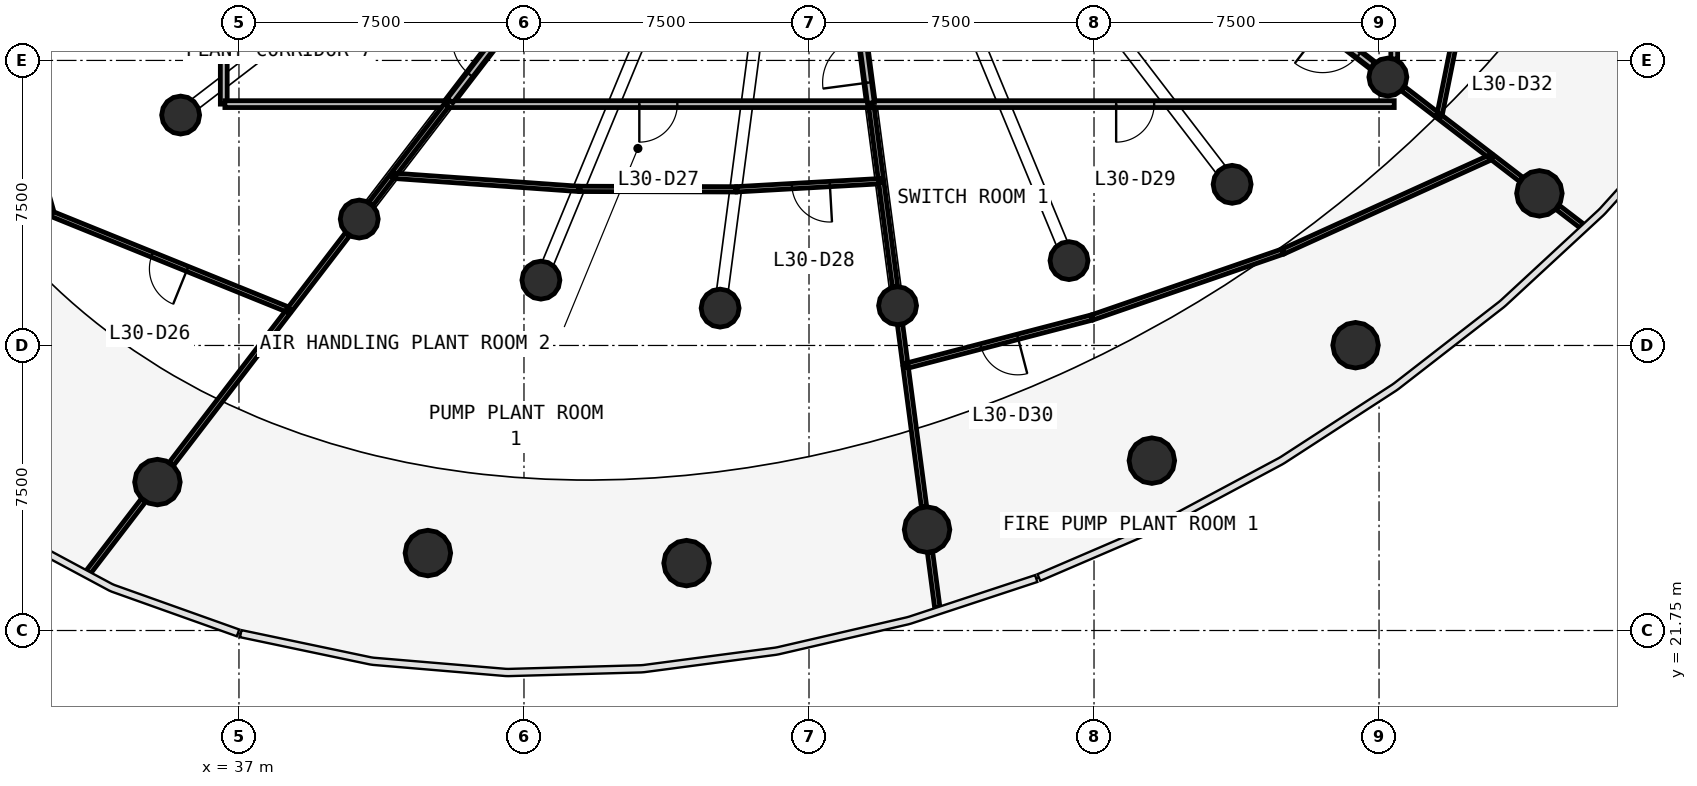
"""IFC4 building model, lengths in metres.
Left out: names, types, materials, properties, quantities, classifications, styles, units other than length and angle.
Written with IfcOpenShell. Run it as: python <this file> out.ifc"""

import sys

from ifc_helpers import new_model, si_unit, direction, frame, frame_2d, origin, origin_2d, place, context, subcontext, project, spatial, rectangle, circle, extrude, source, transform, mapped, element, fill, save


model = new_model("IFC4")
c1 = context("Model", 3, precision=1e-05, world=origin(), true_north=direction((0.0, 1.0)))
c2 = subcontext(c1, "Body", "Model", "MODEL_VIEW")
j1 = project(units=[si_unit("LENGTHUNIT", "METRE"), si_unit("PLANEANGLEUNIT", "RADIAN")], contexts=[c1])
p1 = place(None, origin())
s1 = spatial("IfcSite", under=j1, at=p1, CompositionType="ELEMENT")
p2 = place(p1, origin())
s2 = spatial("IfcBuilding", under=s1, at=p2, CompositionType="ELEMENT")
p3 = place(p2, frame((0.0, 0.0, 129.0)))
s3 = spatial("IfcBuildingStorey", under=s2, at=p3, CompositionType="ELEMENT", Elevation=129.0)
m1 = source(origin(), c2, "Body", "SweptSolid", [
    extrude(circle(Radius=0.6, at=origin_2d()), origin(), (0.0, 0.0, 1.0), 3.78),
])
for number, where, z_axis, x_axis in (
    (1, (34.854, 25.655, 0.0), (0.0, 0.0, 1.0), (1.0, 0.0, 0.0)),
    (2, (41.971, 23.788, 0.0), (0.0, 0.0, 1.0), (1.0, 0.0, 0.0)),
    (3, (48.778, 23.523, 0.0), (0.0, 0.0, 1.0), (1.0, 0.0, 0.0)),
    (4, (55.106, 24.405, 0.0), (0.0, 0.0, 1.0), (1.0, 0.0, 0.0)),
    (5, (61.022, 26.219, 0.0), (0.0, 0.0, 1.0), (1.0, 0.0, 0.0)),
    (6, (66.382, 29.257, 0.0), (0.0, 0.0, 1.0), (1.0, 0.0, 0.0)),
    (7, (71.22, 33.252, 0.0), (0.0, 0.0, 1.0), (1.0, 0.0, 0.0)),
):
    element("IfcColumn", number, at=place(p3, frame(where, z_axis=z_axis, x_axis=x_axis)), inside=s3, PredefinedType="COLUMN", context=c2, shape_type="MappedRepresentation", body=[
        mapped(m1, transform((0.0, 0.0, 0.0), scale=1.0)),
    ])
m2 = source(origin(), c2, "Body", "SweptSolid", [
    extrude(circle(Radius=0.5, at=origin_2d()), origin(), (0.0, 0.0, 1.0), 3.78),
])
for number, where, z_axis, x_axis in (
    (8, (35.465, 35.312, 0.0), (0.0, 0.0, 1.0), (1.0, 0.0, 0.0)),
    (9, (40.165, 32.576, 0.0), (0.0, 0.0, 1.0), (1.0, 0.0, 0.0)),
    (10, (44.945, 30.969, 0.0), (0.0, 0.0, 1.0), (1.0, 0.0, 0.0)),
    (11, (49.661, 30.233, 0.0), (0.0, 0.0, 1.0), (1.0, 0.0, 0.0)),
    (12, (54.331, 30.297, 0.0), (0.0, 0.0, 1.0), (1.0, 0.0, 0.0)),
    (13, (58.842, 31.482, 0.0), (0.0, 0.0, 1.0), (1.0, 0.0, 0.0)),
    (14, (63.134, 33.49, 0.0), (0.0, 0.0, 1.0), (1.0, 0.0, 0.0)),
    (15, (67.232, 36.312, 0.0), (0.0, 0.0, 1.0), (1.0, 0.0, 0.0)),
):
    element("IfcColumn", number, at=place(p3, frame(where, z_axis=z_axis, x_axis=x_axis)), inside=s3, PredefinedType="COLUMN", context=c2, shape_type="MappedRepresentation", body=[
        mapped(m2, transform((0.0, 0.0, 0.0), scale=1.0)),
    ])
p4 = place(p3, frame((67.4, 35.6, 0.0), z_axis=(0.0, 0.0, 1.0), x_axis=(-1.0, 0.0, 0.0)))
e16 = element("IfcWall", 16, at=p4, inside=s3, PredefinedType="PARTITIONING", context=c2, shape_type="SweptSolid", body=[
    extrude(rectangle(XDim=13.767, YDim=0.18, at=frame_2d((6.884, 0.0))), origin(), (0.0, 0.0, 1.0), 2.58),
])
p5 = place(p4, frame((6.317, 0.0, 0.0)))
e17 = element("IfcOpeningElement", 17, at=p5, cuts=e16, PredefinedType="OPENING", context=c2, shape_type="SweptSolid", body=[
    extrude(rectangle(XDim=1.0, YDim=2.1, at=frame_2d((0.5, 1.05))), frame((0.0, 0.1, 0.0), z_axis=(0.0, -1.0, 0.0), x_axis=(1.0, 0.0, 0.0)), (0.0, 0.0, 1.0), 0.2),
])
p6 = place(p3, frame((67.4, 50.027, 0.0), z_axis=(0.0, 0.0, 1.0), x_axis=(0.0, -1.0, 0.0)))
e18 = element("IfcWall", 18, at=p6, inside=s3, PredefinedType="PARTITIONING", context=c2, shape_type="SweptSolid", body=[
    extrude(rectangle(XDim=13.24, YDim=0.18, at=frame_2d((6.62, 0.0))), origin(), (0.0, 0.0, 1.0), 2.58),
])
p7 = place(p6, frame((6.19, 0.0, 0.0)))
e19 = element("IfcOpeningElement", 19, at=p7, cuts=e18, PredefinedType="OPENING", context=c2, shape_type="SweptSolid", body=[
    extrude(rectangle(XDim=1.0, YDim=2.1, at=frame_2d((0.5, 1.05))), frame((0.0, 0.1, 0.0), z_axis=(0.0, -1.0, 0.0), x_axis=(1.0, 0.0, 0.0)), (0.0, 0.0, 1.0), 0.2),
])
p8 = place(p3, frame((53.603, 35.6, 0.0), z_axis=(0.0, 0.0, 1.0), x_axis=(-1.0, 0.0, 0.0)))
e20 = element("IfcWall", 20, at=p8, inside=s3, PredefinedType="PARTITIONING", context=c2, shape_type="SweptSolid", body=[
    extrude(rectangle(XDim=11.117, YDim=0.18, at=frame_2d((5.559, 0.0))), origin(), (0.0, 0.0, 1.0), 2.58),
])
p9 = place(p8, frame((5.067, 0.0, 0.0)))
e21 = element("IfcOpeningElement", 21, at=p9, cuts=e20, PredefinedType="OPENING", context=c2, shape_type="SweptSolid", body=[
    extrude(rectangle(XDim=1.0, YDim=2.1, at=frame_2d((0.5, 1.05))), frame((0.0, 0.1, 0.0), z_axis=(0.0, -1.0, 0.0), x_axis=(1.0, 0.0, 0.0)), (0.0, 0.0, 1.0), 0.2),
])
p10 = place(p3, frame((36.6, 35.6, 0.0), z_axis=(0.0, 0.0, 1.0), x_axis=(0.0, 1.0, 0.0)))
e22 = element("IfcWall", 22, at=p10, inside=s3, PredefinedType="PARTITIONING", context=c2, shape_type="SweptSolid", body=[
    extrude(rectangle(XDim=10.343, YDim=0.18, at=frame_2d((5.171, 0.0))), origin(), (0.0, 0.0, 1.0), 2.58),
])
p11 = place(p10, frame((4.693, 0.0, 0.0)))
e23 = element("IfcOpeningElement", 23, at=p11, cuts=e22, PredefinedType="OPENING", context=c2, shape_type="SweptSolid", body=[
    extrude(rectangle(XDim=1.0, YDim=2.1, at=frame_2d((0.5, 1.05))), frame((0.0, 0.1, 0.0), z_axis=(0.0, -1.0, 0.0), x_axis=(1.0, 0.0, 0.0)), (0.0, 0.0, 1.0), 0.2),
])
p12 = place(p3, frame((36.63, 35.6, 0.0), z_axis=(0.0, 0.0, 1.0), x_axis=(1.0, 0.0, 0.0)))
e24 = element("IfcWall", 24, at=p12, inside=s3, PredefinedType="PARTITIONING", context=c2, shape_type="SweptSolid", body=[
    extrude(rectangle(XDim=5.825, YDim=0.18, at=frame_2d((2.913, 0.0))), origin(), (0.0, 0.0, 1.0), 2.58),
])
p13 = place(p3, frame((42.554, 35.69, 0.0), z_axis=(0.0, 0.0, 1.0), x_axis=(0.608737787706, 0.793371480341, 0.0)))
e25 = element("IfcWall", 25, at=p13, inside=s3, PredefinedType="PARTITIONING", context=c2, shape_type="SweptSolid", body=[
    extrude(rectangle(XDim=2.912, YDim=0.18, at=frame_2d((1.456, 0.0))), origin(), (0.0, 0.0, 1.0), 2.58),
])
p14 = place(p13, frame((0.862, 0.0, 0.0)))
e26 = element("IfcOpeningElement", 26, at=p14, cuts=e25, PredefinedType="OPENING", context=c2, shape_type="SweptSolid", body=[
    extrude(rectangle(XDim=1.2, YDim=2.1, at=frame_2d((0.6, 1.05))), frame((0.0, 0.1, 0.0), z_axis=(0.0, -1.0, 0.0), x_axis=(1.0, 0.0, 0.0)), (0.0, 0.0, 1.0), 0.2),
])
p15 = place(p3, frame((53.629, 35.63, 0.0), z_axis=(0.0, 0.0, 1.0), x_axis=(-0.13060507681, 0.991434472828, 0.0)))
e27 = element("IfcWall", 27, at=p15, inside=s3, PredefinedType="PARTITIONING", context=c2, shape_type="SweptSolid", body=[
    extrude(rectangle(XDim=2.391, YDim=0.18, at=frame_2d((1.195, 0.0))), origin(), (0.0, 0.0, 1.0), 2.58),
])
p16 = place(p15, frame((0.541, 0.0, 0.0)))
e28 = element("IfcOpeningElement", 28, at=p16, cuts=e27, PredefinedType="OPENING", context=c2, shape_type="SweptSolid", body=[
    extrude(rectangle(XDim=1.2, YDim=2.1, at=frame_2d((0.6, 1.05))), frame((0.0, 0.1, 0.0), z_axis=(0.0, -1.0, 0.0), x_axis=(1.0, 0.0, 0.0)), (0.0, 0.0, 1.0), 0.2),
])
p17 = place(p3, frame((66.832, 36.619, 0.0), z_axis=(0.0, 0.0, 1.0), x_axis=(-0.793393624489, 0.608708926023, 0.0)))
e29 = element("IfcWall", 29, at=p17, inside=s3, PredefinedType="PARTITIONING", context=c2, shape_type="SweptSolid", body=[
    extrude(rectangle(XDim=2.309, YDim=0.18, at=frame_2d((1.155, 0.0))), origin(), (0.0, 0.0, 1.0), 2.58),
])
p18 = place(p17, frame((0.459, 0.0, 0.0)))
e30 = element("IfcOpeningElement", 30, at=p18, cuts=e29, PredefinedType="OPENING", context=c2, shape_type="SweptSolid", body=[
    extrude(rectangle(XDim=1.2, YDim=2.1, at=frame_2d((0.6, 1.05))), frame((0.0, 0.1, 0.0), z_axis=(0.0, -1.0, 0.0), x_axis=(1.0, 0.0, 0.0)), (0.0, 0.0, 1.0), 0.2),
])
p19 = place(p3, frame((38.325, 30.179, 0.0), z_axis=(0.0, 0.0, 1.0), x_axis=(-0.926824754309, 0.375494174122, 0.0)))
e31 = element("IfcWall", 31, at=p19, inside=s3, PredefinedType="PARTITIONING", context=c2, shape_type="SweptSolid", body=[
    extrude(rectangle(XDim=6.744, YDim=0.14, at=frame_2d((3.372, 0.0))), origin(), (0.0, 0.0, 1.0), 2.58),
])
p20 = place(p19, frame((2.894, 0.0, 0.0)))
e32 = element("IfcOpeningElement", 32, at=p20, cuts=e31, PredefinedType="OPENING", context=c2, shape_type="SweptSolid", body=[
    extrude(rectangle(XDim=1.0, YDim=2.1, at=frame_2d((0.5, 1.05))), frame((0.0, 0.08, 0.0), z_axis=(0.0, -1.0, 0.0), x_axis=(1.0, 0.0, 0.0)), (0.0, 0.0, 1.0), 0.16),
])
p21 = place(p3, frame((30.288, 39.006, 0.0), z_axis=(0.0, 0.0, 1.0), x_axis=(0.273146643533, -0.961972406635, 0.0)))
e33 = element("IfcWall", 33, at=p21, inside=s3, PredefinedType="PARTITIONING", context=c2, shape_type="SweptSolid", body=[
    extrude(rectangle(XDim=6.514, YDim=0.14, at=frame_2d((3.257, 0.0))), origin(), (0.0, 0.0, 1.0), 2.58),
])
p22 = place(p3, frame((64.486, 31.728, 0.0), z_axis=(0.0, 0.0, 1.0), x_axis=(0.910630285698, 0.413222074397, 0.0)))
e34 = element("IfcWall", 34, at=p22, inside=s3, PredefinedType="PARTITIONING", context=c2, shape_type="SweptSolid", body=[
    extrude(rectangle(XDim=6.018, YDim=0.14, at=frame_2d((3.009, 0.0))), origin(), (0.0, 0.0, 1.0), 2.58),
])
p23 = place(p3, frame((69.672, 40.68, 0.0), z_axis=(0.0, 0.0, 1.0), x_axis=(-0.197248441668, -0.980353534323, 0.0)))
e35 = element("IfcWall", 35, at=p23, inside=s3, PredefinedType="PARTITIONING", context=c2, shape_type="SweptSolid", body=[
    extrude(rectangle(XDim=5.514, YDim=0.14, at=frame_2d((2.757, 0.0))), origin(), (0.0, 0.0, 1.0), 2.58),
])
p24 = place(p23, frame((2.264, 0.0, 0.0)))
e36 = element("IfcOpeningElement", 36, at=p24, cuts=e35, PredefinedType="OPENING", context=c2, shape_type="SweptSolid", body=[
    extrude(rectangle(XDim=1.0, YDim=2.1, at=frame_2d((0.5, 1.05))), frame((0.0, 0.08, 0.0), z_axis=(0.0, -1.0, 0.0), x_axis=(1.0, 0.0, 0.0)), (0.0, 0.0, 1.0), 0.16),
])
p25 = place(p3, frame((59.46, 29.99, 0.0), z_axis=(0.0, 0.0, 1.0), x_axis=(0.945116087861, 0.326734724918, 0.0)))
e37 = element("IfcWall", 37, at=p25, inside=s3, PredefinedType="PARTITIONING", context=c2, shape_type="SweptSolid", body=[
    extrude(rectangle(XDim=5.288, YDim=0.14, at=frame_2d((2.644, 0.0))), origin(), (0.0, 0.0, 1.0), 2.58),
])
p26 = place(p3, frame((38.281, 30.121, 0.0), z_axis=(0.0, 0.0, 1.0), x_axis=(-0.60874767724, -0.793363892205, 0.0)))
e38 = element("IfcWall", 38, at=p26, inside=s3, PredefinedType="PARTITIONING", context=c2, shape_type="SweptSolid", body=[
    extrude(rectangle(XDim=5.025, YDim=0.14, at=frame_2d((2.513, 0.0))), origin(), (0.0, 0.0, 1.0), 2.58),
])
p27 = place(p3, frame((59.431, 29.983, 0.0), z_axis=(0.0, 0.0, 1.0), x_axis=(-0.967691095233, -0.252138739998, 0.0)))
e39 = element("IfcWall", 39, at=p27, inside=s3, PredefinedType="PARTITIONING", context=c2, shape_type="SweptSolid", body=[
    extrude(rectangle(XDim=5.054, YDim=0.14, at=frame_2d((2.527, 0.0))), origin(), (0.0, 0.0, 1.0), 2.58),
])
p28 = place(p27, frame((2.004, 0.0, 0.0)))
e40 = element("IfcOpeningElement", 40, at=p28, cuts=e39, PredefinedType="OPENING", context=c2, shape_type="SweptSolid", body=[
    extrude(rectangle(XDim=1.0, YDim=2.1, at=frame_2d((0.5, 1.05))), frame((0.0, 0.08, 0.0), z_axis=(0.0, -1.0, 0.0), x_axis=(1.0, 0.0, 0.0)), (0.0, 0.0, 1.0), 0.16),
])
p29 = place(p3, frame((41.04, 33.717, 0.0), z_axis=(0.0, 0.0, 1.0), x_axis=(0.997502909213, -0.070625392825, 0.0)))
e41 = element("IfcWall", 41, at=p29, inside=s3, PredefinedType="PARTITIONING", context=c2, shape_type="SweptSolid", body=[
    extrude(rectangle(XDim=4.912, YDim=0.14, at=frame_2d((2.456, 0.0))), origin(), (0.0, 0.0, 1.0), 2.58),
])
p30 = place(p3, frame((45.97, 33.37, 0.0), z_axis=(0.0, 0.0, 1.0), x_axis=(0.999995748074, -0.002916133527, 0.0)))
e42 = element("IfcWall", 42, at=p30, inside=s3, PredefinedType="PARTITIONING", context=c2, shape_type="SweptSolid", body=[
    extrude(rectangle(XDim=4.102, YDim=0.14, at=frame_2d((2.051, 0.0))), origin(), (0.0, 0.0, 1.0), 2.58),
])
p31 = place(p3, frame((53.899, 33.574, 0.0), z_axis=(0.0, 0.0, 1.0), x_axis=(-0.998406558005, -0.056430000288, 0.0)))
e43 = element("IfcWall", 43, at=p31, inside=s3, PredefinedType="PARTITIONING", context=c2, shape_type="SweptSolid", body=[
    extrude(rectangle(XDim=3.803, YDim=0.14, at=frame_2d((1.901, 0.0))), origin(), (0.0, 0.0, 1.0), 2.58),
])
p32 = place(p31, frame((1.353, 0.0, 0.0)))
e44 = element("IfcOpeningElement", 44, at=p32, cuts=e43, PredefinedType="OPENING", context=c2, shape_type="SweptSolid", body=[
    extrude(rectangle(XDim=1.0, YDim=2.1, at=frame_2d((0.5, 1.05))), frame((0.0, 0.08, 0.0), z_axis=(0.0, -1.0, 0.0), x_axis=(1.0, 0.0, 0.0)), (0.0, 0.0, 1.0), 0.16),
])
p33 = place(p3, frame((54.544, 28.678, 0.0), z_axis=(0.0, 0.0, 1.0), x_axis=(0.130558454313, -0.991440613455, 0.0)))
e45 = element("IfcWall", 45, at=p33, inside=s3, PredefinedType="PARTITIONING", context=c2, shape_type="SweptSolid", body=[
    extrude(rectangle(XDim=3.706, YDim=0.14, at=frame_2d((1.853, 0.0))), origin(), (0.0, 0.0, 1.0), 2.58),
])
p34 = place(p3, frame((53.903, 33.545, 0.0), z_axis=(0.0, 0.0, 1.0), x_axis=(0.130536537493, -0.991443499338, 0.0)))
e46 = element("IfcWall", 46, at=p34, inside=s3, PredefinedType="PARTITIONING", context=c2, shape_type="SweptSolid", body=[
    extrude(rectangle(XDim=2.772, YDim=0.14, at=frame_2d((1.386, 0.0))), origin(), (0.0, 0.0, 1.0), 2.58),
])
p35 = place(p3, frame((39.858, 32.176, 0.0), z_axis=(0.0, 0.0, 1.0), x_axis=(-0.608804420468, -0.793320349934, 0.0)))
e47 = element("IfcWall", 47, at=p35, inside=s3, PredefinedType="PARTITIONING", context=c2, shape_type="SweptSolid", body=[
    extrude(rectangle(XDim=2.488, YDim=0.14, at=frame_2d((1.244, 0.0))), origin(), (0.0, 0.0, 1.0), 2.58),
])
p36 = place(p3, frame((34.486, 25.176, 0.0), z_axis=(0.0, 0.0, 1.0), x_axis=(-0.608723111947, -0.793382740537, 0.0)))
e48 = element("IfcWall", 48, at=p36, inside=s3, PredefinedType="PARTITIONING", context=c2, shape_type="SweptSolid", body=[
    extrude(rectangle(XDim=2.39, YDim=0.14, at=frame_2d((1.195, 0.0))), origin(), (0.0, 0.0, 1.0), 2.98),
])
p37 = place(p3, frame((42.463, 35.571, 0.0), z_axis=(0.0, 0.0, 1.0), x_axis=(-0.608788650818, -0.79333245152, 0.0)))
e49 = element("IfcWall", 49, at=p37, inside=s3, PredefinedType="PARTITIONING", context=c2, shape_type="SweptSolid", body=[
    extrude(rectangle(XDim=2.253, YDim=0.14, at=frame_2d((1.126, 0.0))), origin(), (0.0, 0.0, 1.0), 2.58),
])
p38 = place(p3, frame((53.644, 35.51, 0.0), z_axis=(0.0, 0.0, 1.0), x_axis=(0.130498135038, -0.991448554768, 0.0)))
e50 = element("IfcWall", 50, at=p38, inside=s3, PredefinedType="PARTITIONING", context=c2, shape_type="SweptSolid", body=[
    extrude(rectangle(XDim=1.882, YDim=0.14, at=frame_2d((0.941, 0.0))), origin(), (0.0, 0.0, 1.0), 2.58),
])
p39 = place(p3, frame((68.608, 35.256, 0.0), z_axis=(0.0, 0.0, 1.0), x_axis=(0.793418526324, -0.608676467498, 0.0)))
e51 = element("IfcWall", 51, at=p39, inside=s3, PredefinedType="PARTITIONING", context=c2, shape_type="SweptSolid", body=[
    extrude(rectangle(XDim=1.632, YDim=0.14, at=frame_2d((0.816, 0.0))), origin(), (0.0, 0.0, 1.0), 2.58),
])
p40 = place(p3, frame((55.185, 23.805, 0.0), z_axis=(0.0, 0.0, 1.0), x_axis=(0.13042446584, -0.991458248597, 0.0)))
e52 = element("IfcWall", 52, at=p40, inside=s3, PredefinedType="PARTITIONING", context=c2, shape_type="SweptSolid", body=[
    extrude(rectangle(XDim=1.471, YDim=0.14, at=frame_2d((0.736, 0.0))), origin(), (0.0, 0.0, 1.0), 2.98),
])
p41 = place(p3, frame((67.633, 36.005, 0.0), z_axis=(0.0, 0.0, 1.0), x_axis=(0.793448671778, -0.60863717045, 0.0)))
e53 = element("IfcWall", 53, at=p41, inside=s3, PredefinedType="PARTITIONING", context=c2, shape_type="SweptSolid", body=[
    extrude(rectangle(XDim=1.122, YDim=0.14, at=frame_2d((0.561, 0.0))), origin(), (0.0, 0.0, 1.0), 2.58),
])
p42 = place(p3, frame((54.396, 29.797, 0.0), z_axis=(0.0, 0.0, 1.0), x_axis=(0.130497554193, -0.991448631221, 0.0)))
e54 = element("IfcWall", 54, at=p42, inside=s3, PredefinedType="PARTITIONING", context=c2, shape_type="SweptSolid", body=[
    extrude(rectangle(XDim=1.027, YDim=0.14, at=frame_2d((0.514, 0.0))), origin(), (0.0, 0.0, 1.0), 2.58),
])
p43 = place(p3, frame((69.99, 34.196, 0.0), z_axis=(0.0, 0.0, 1.0), x_axis=(0.793419442559, -0.60867527317, 0.0)))
e55 = element("IfcWall", 55, at=p43, inside=s3, PredefinedType="PARTITIONING", context=c2, shape_type="SweptSolid", body=[
    extrude(rectangle(XDim=0.946, YDim=0.14, at=frame_2d((0.473, 0.0))), origin(), (0.0, 0.0, 1.0), 2.58),
])
p44 = place(p3, frame((41.022, 33.693, 0.0), z_axis=(0.0, 0.0, 1.0), x_axis=(-0.608783191851, -0.793336640601, 0.0)))
e56 = element("IfcWall", 56, at=p44, inside=s3, PredefinedType="PARTITIONING", context=c2, shape_type="SweptSolid", body=[
    extrude(rectangle(XDim=0.904, YDim=0.14, at=frame_2d((0.452, 0.0))), origin(), (0.0, 0.0, 1.0), 2.58),
])
p45 = place(p3, frame((71.699, 32.884, 0.0), z_axis=(0.0, 0.0, 1.0), x_axis=(0.793326455239, -0.608796464689, 0.0)))
e57 = element("IfcWall", 57, at=p45, inside=s3, PredefinedType="PARTITIONING", context=c2, shape_type="SweptSolid", body=[
    extrude(rectangle(XDim=0.801, YDim=0.14, at=frame_2d((0.4, 0.0))), origin(), (0.0, 0.0, 1.0), 2.98),
])
m3 = source(origin(), c2, "Body", "SweptSolid", [
    extrude(rectangle(XDim=1.0, YDim=2.1, at=frame_2d((0.5, 1.05))), frame((0.0, 0.025, 0.0), z_axis=(0.0, -1.0, 0.0), x_axis=(1.0, 0.0, 0.0)), (0.0, 0.0, 1.0), 0.05),
])
p46 = place(p20, origin())
e58 = element("IfcDoor", 58, at=p46, inside=s3, OperationType="SINGLE_SWING_LEFT", PredefinedType="DOOR", context=c2, shape_type="MappedRepresentation", body=[
    mapped(m3, transform((0.0, 0.0, 0.0), scale=1.0)),
])
fill(e32, e58)
p47 = place(p9, origin())
e59 = element("IfcDoor", 59, at=p47, inside=s3, OperationType="SINGLE_SWING_RIGHT", PredefinedType="DOOR", context=c2, shape_type="MappedRepresentation", body=[
    mapped(m3, transform((0.0, 0.0, 0.0), scale=1.0)),
])
fill(e21, e59)
p48 = place(p32, origin())
e60 = element("IfcDoor", 60, at=p48, inside=s3, OperationType="SINGLE_SWING_LEFT", PredefinedType="DOOR", context=c2, shape_type="MappedRepresentation", body=[
    mapped(m3, transform((0.0, 0.0, 0.0), scale=1.0)),
])
fill(e44, e60)
p49 = place(p5, origin())
e61 = element("IfcDoor", 61, at=p49, inside=s3, OperationType="SINGLE_SWING_RIGHT", PredefinedType="DOOR", context=c2, shape_type="MappedRepresentation", body=[
    mapped(m3, transform((0.0, 0.0, 0.0), scale=1.0)),
])
fill(e17, e61)
p50 = place(p28, origin())
e62 = element("IfcDoor", 62, at=p50, inside=s3, OperationType="SINGLE_SWING_LEFT", PredefinedType="DOOR", context=c2, shape_type="MappedRepresentation", body=[
    mapped(m3, transform((0.0, 0.0, 0.0), scale=1.0)),
])
fill(e40, e62)
m4 = source(origin(), c2, "Body", "SweptSolid", [
    extrude(rectangle(XDim=1.2, YDim=2.1, at=frame_2d((0.6, 1.05))), frame((0.0, 0.025, 0.0), z_axis=(0.0, -1.0, 0.0), x_axis=(1.0, 0.0, 0.0)), (0.0, 0.0, 1.0), 0.05),
])
p51 = place(p14, origin())
e63 = element("IfcDoor", 63, at=p51, inside=s3, OperationType="SINGLE_SWING_RIGHT", PredefinedType="DOOR", context=c2, shape_type="MappedRepresentation", body=[
    mapped(m4, transform((0.0, 0.0, 0.0), scale=1.0)),
])
fill(e26, e63)
p52 = place(p16, origin())
e64 = element("IfcDoor", 64, at=p52, inside=s3, OperationType="SINGLE_SWING_LEFT", PredefinedType="DOOR", context=c2, shape_type="MappedRepresentation", body=[
    mapped(m4, transform((0.0, 0.0, 0.0), scale=1.0)),
])
fill(e28, e64)
p53 = place(p18, origin())
e65 = element("IfcDoor", 65, at=p53, inside=s3, OperationType="SINGLE_SWING_RIGHT", PredefinedType="DOOR", context=c2, shape_type="MappedRepresentation", body=[
    mapped(m4, transform((0.0, 0.0, 0.0), scale=1.0)),
])
fill(e30, e65)
save(model, sys.argv[1])
